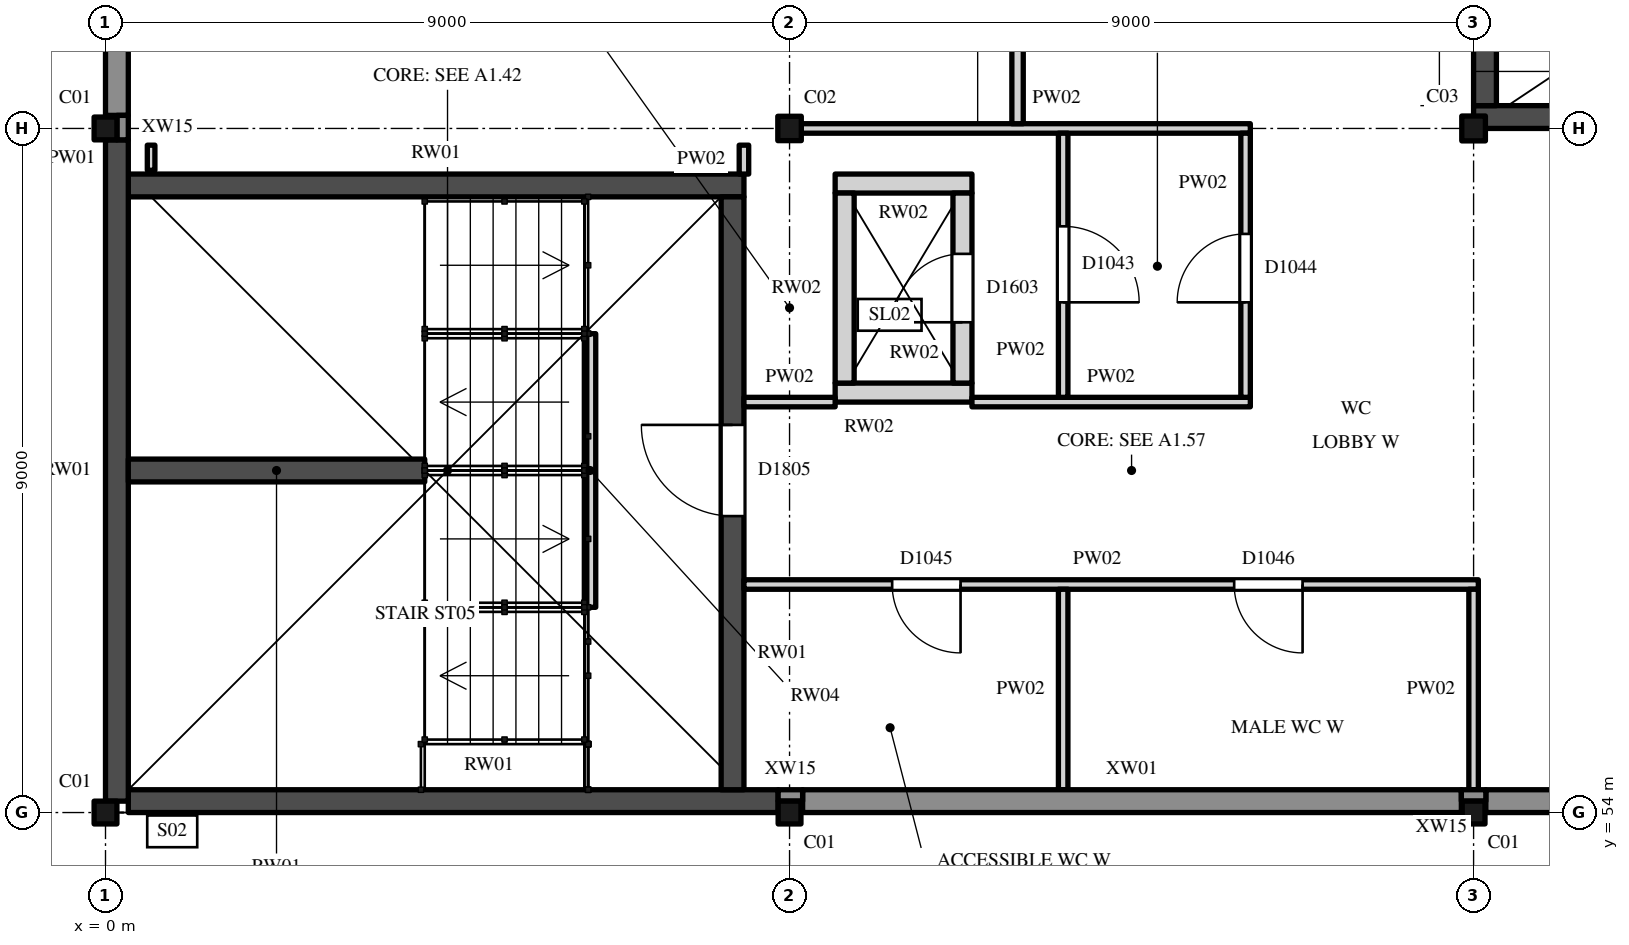
"""IFC4 building model, lengths in metres.
Left out: names, types, materials, properties, quantities, classifications, styles, units other than length and angle.
Written with IfcOpenShell. Run it as: python <this file> out.ifc"""

import sys

from ifc_helpers import new_model, si_unit, direction, frame, frame_2d, origin, origin_2d, place, context, subcontext, project, spatial, rectangle, hollow_rectangle, i_section, extrude, element, fill, save


model = new_model("IFC4")
c1 = context("Model", 3, precision=1e-05, world=origin(), true_north=direction((0.0, 1.0)))
c2 = subcontext(c1, "Body", "Model", "MODEL_VIEW")
j1 = project(units=[si_unit("LENGTHUNIT", "METRE"), si_unit("PLANEANGLEUNIT", "RADIAN")], contexts=[c1])
p1 = place(None, origin())
s1 = spatial("IfcSite", under=j1, at=p1, CompositionType="ELEMENT")
p2 = place(p1, origin())
s2 = spatial("IfcBuilding", under=s1, at=p2, CompositionType="ELEMENT")
p3 = place(p2, frame((0.0, 0.0, 6.0)))
s3 = spatial("IfcBuildingStorey", under=s2, at=p3, CompositionType="ELEMENT", Elevation=6.0)
for number, where, z_axis, x_axis in (
    (1, (0.0, 54.0, 0.0), (0.0, 0.0, 1.0), (1.0, 0.0, 0.0)),
    (2, (9.0, 54.0, 0.0), (0.0, 0.0, 1.0), (1.0, 0.0, 0.0)),
    (3, (18.0, 54.0, 0.0), (0.0, 0.0, 1.0), (1.0, 0.0, 0.0)),
    (4, (0.0, 63.0, 0.0), (0.0, 0.0, 1.0), (1.0, 0.0, 0.0)),
):
    element("IfcColumn", number, at=place(p3, frame(where, z_axis=z_axis, x_axis=x_axis)), inside=s3, PredefinedType="COLUMN", context=c2, shape_type="SweptSolid", body=[
        extrude(hollow_rectangle(XDim=0.3, YDim=0.3, WallThickness=0.012, InnerFilletRadius=0.019, OuterFilletRadius=0.031, at=origin_2d()), origin(), (0.0, 0.0, 1.0), 5.0),
    ])
p4 = place(p3, frame((9.0, 63.0, 0.0), z_axis=(0.0, 0.0, 1.0), x_axis=(1.0, 0.0, 0.0)))
e5 = element("IfcColumn", 5, at=p4, inside=s3, PredefinedType="COLUMN", context=c2, shape_type="SweptSolid", body=[
    extrude(i_section(OverallWidth=0.309, OverallDepth=0.321, WebThickness=0.014, FlangeThickness=0.022, FilletRadius=0.017, at=origin_2d()), origin(), (0.0, 0.0, 1.0), 5.0),
])
p5 = place(p3, frame((18.0, 63.0, 0.0), z_axis=(0.0, 0.0, 1.0), x_axis=(1.0, 0.0, 0.0)))
e6 = element("IfcColumn", 6, at=p5, inside=s3, PredefinedType="COLUMN", context=c2, shape_type="SweptSolid", body=[
    extrude(i_section(OverallWidth=0.311, OverallDepth=0.327, WebThickness=0.016, FlangeThickness=0.025, FilletRadius=0.017, at=origin_2d()), origin(), (0.0, 0.0, 1.0), 5.0),
])
p6 = place(p3, frame((0.3, 54.15, 0.0), z_axis=(0.0, 0.0, 1.0), x_axis=(1.0, 0.0, 0.0)))
e7 = element("IfcWall", 7, at=p6, inside=s3, PredefinedType="SHEAR", context=c2, shape_type="SweptSolid", body=[
    extrude(rectangle(XDim=8.55, YDim=0.3, at=frame_2d((4.275, 0.0))), origin(), (0.0, 0.0, 1.0), 5.0),
])
p7 = place(p3, frame((0.3, 62.25, 0.0), z_axis=(0.0, 0.0, 1.0), x_axis=(1.0, 0.0, 0.0)))
e8 = element("IfcWall", 8, at=p7, inside=s3, PredefinedType="SHEAR", context=c2, shape_type="SweptSolid", body=[
    extrude(rectangle(XDim=8.1, YDim=0.3, at=frame_2d((4.05, 0.0))), origin(), (0.0, 0.0, 1.0), 5.0),
])
p8 = place(p3, frame((0.15, 54.15, 0.0), z_axis=(0.0, 0.0, 1.0), x_axis=(0.0, 1.0, 0.0)))
e9 = element("IfcWall", 9, at=p8, inside=s3, PredefinedType="SHEAR", context=c2, shape_type="SweptSolid", body=[
    extrude(rectangle(XDim=8.7, YDim=0.3, at=frame_2d((4.35, 0.0))), origin(), (0.0, 0.0, 1.0), 5.0),
])
p9 = place(p3, frame((8.25, 54.3, 0.0), z_axis=(0.0, 0.0, 1.0), x_axis=(0.0, 1.0, 0.0)))
e10 = element("IfcWall", 10, at=p9, inside=s3, PredefinedType="SHEAR", context=c2, shape_type="SweptSolid", body=[
    extrude(rectangle(XDim=7.8, YDim=0.3, at=frame_2d((3.9, 0.0))), origin(), (0.0, 0.0, 1.0), 5.0),
])
p10 = place(p9, frame((3.6, 0.0, 0.0)))
e11 = element("IfcOpeningElement", 11, at=p10, cuts=e10, PredefinedType="OPENING", context=c2, shape_type="SweptSolid", body=[
    extrude(rectangle(XDim=1.2, YDim=2.1, at=frame_2d((0.6, 1.05))), frame((0.0, 0.16, 0.0), z_axis=(0.0, -1.0, 0.0), x_axis=(1.0, 0.0, 0.0)), (0.0, 0.0, 1.0), 0.32),
])
p11 = place(p3, frame((4.2, 58.5, 0.0), z_axis=(0.0, 0.0, 1.0), x_axis=(-1.0, 0.0, 0.0)))
e12 = element("IfcWall", 12, at=p11, inside=s3, PredefinedType="SHEAR", context=c2, shape_type="SweptSolid", body=[
    extrude(rectangle(XDim=3.9, YDim=0.3, at=frame_2d((1.95, 0.0))), origin(), (0.0, 0.0, 1.0), 5.0),
])
p12 = place(p3, frame((6.375, 56.7, 0.0), z_axis=(0.0, 0.0, 1.0), x_axis=(0.0, 1.0, 0.0)))
e13 = element("IfcWall", 13, at=p12, inside=s3, PredefinedType="STANDARD", context=c2, shape_type="SweptSolid", body=[
    extrude(rectangle(XDim=3.6, YDim=0.15, at=frame_2d((1.8, 0.0))), origin(), (0.0, 0.0, 1.0), 2.3),
])
for number, where, z_axis, x_axis in (
    (14, (9.6, 59.525, 0.0), (0.0, 0.0, 1.0), (1.0, 0.0, 0.0)),
    (15, (9.6, 62.275, 0.0), (0.0, 0.0, 1.0), (1.0, 0.0, 0.0)),
):
    element("IfcWall", number, at=place(p3, frame(where, z_axis=z_axis, x_axis=x_axis)), inside=s3, PredefinedType="STANDARD", context=c2, shape_type="SweptSolid", body=[
        extrude(rectangle(XDim=1.8, YDim=0.25, at=frame_2d((0.9, 0.0))), origin(), (0.0, 0.0, 1.0), 5.0),
    ])
p13 = place(p3, frame((9.725, 59.65, 0.0), z_axis=(0.0, 0.0, 1.0), x_axis=(0.0, 1.0, 0.0)))
e16 = element("IfcWall", 16, at=p13, inside=s3, PredefinedType="STANDARD", context=c2, shape_type="SweptSolid", body=[
    extrude(rectangle(XDim=2.5, YDim=0.25, at=frame_2d((1.25, 0.0))), origin(), (0.0, 0.0, 1.0), 5.0),
])
p14 = place(p3, frame((11.275, 59.65, 0.0), z_axis=(0.0, 0.0, 1.0), x_axis=(0.0, 1.0, 0.0)))
e17 = element("IfcWall", 17, at=p14, inside=s3, PredefinedType="STANDARD", context=c2, shape_type="SweptSolid", body=[
    extrude(rectangle(XDim=2.5, YDim=0.25, at=frame_2d((1.25, 0.0))), origin(), (0.0, 0.0, 1.0), 5.0),
])
p15 = place(p14, frame((0.8, 0.0, 0.0)))
e18 = element("IfcOpeningElement", 18, at=p15, cuts=e17, PredefinedType="OPENING", context=c2, shape_type="SweptSolid", body=[
    extrude(rectangle(XDim=0.9, YDim=2.1, at=frame_2d((0.45, 1.05))), frame((0.0, 0.135, 0.0), z_axis=(0.0, -1.0, 0.0), x_axis=(1.0, 0.0, 0.0)), (0.0, 0.0, 1.0), 0.27),
])
p16 = place(p3, frame((18.0, 63.15, 0.0), z_axis=(0.0, 0.0, 1.0), x_axis=(1.0, 0.0, 0.0)))
e19 = element("IfcWall", 19, at=p16, inside=s3, PredefinedType="SHEAR", context=c2, shape_type="SweptSolid", body=[
    extrude(rectangle(XDim=9.0, YDim=0.3, at=frame_2d((4.5, 0.0))), origin(), (0.0, 0.0, 1.0), 4.825),
])
p17 = place(p3, frame((18.15, 63.3, 0.0), z_axis=(0.0, 0.0, 1.0), x_axis=(0.0, 1.0, 0.0)))
e20 = element("IfcWall", 20, at=p17, inside=s3, PredefinedType="SHEAR", context=c2, shape_type="SweptSolid", body=[
    extrude(rectangle(XDim=8.7, YDim=0.3, at=frame_2d((4.35, 0.0))), origin(), (0.0, 0.0, 1.0), 4.825),
])
p18 = place(p3, frame((9.172, 54.15, 0.0), z_axis=(0.0, 0.0, 1.0), x_axis=(1.0, 0.0, 0.0)))
e21 = element("IfcWall", 21, at=p18, inside=s3, PredefinedType="SOLIDWALL", context=c2, shape_type="SweptSolid", body=[
    extrude(rectangle(XDim=8.667, YDim=0.3, at=frame_2d((4.333, 0.0))), origin(), (0.0, 0.0, 1.0), 4.469),
])
p19 = place(p3, frame((18.161, 54.15, 0.0), z_axis=(0.0, 0.0, 1.0), x_axis=(1.0, 0.0, 0.0)))
e22 = element("IfcWall", 22, at=p19, inside=s3, PredefinedType="SOLIDWALL", context=c2, shape_type="SweptSolid", body=[
    extrude(rectangle(XDim=8.678, YDim=0.3, at=frame_2d((4.339, 0.0))), origin(), (0.0, 0.0, 1.0), 4.469),
])
p20 = place(p3, frame((0.15, 63.172, 0.0), z_axis=(0.0, 0.0, 1.0), x_axis=(0.0, 1.0, 0.0)))
e23 = element("IfcWall", 23, at=p20, inside=s3, PredefinedType="SOLIDWALL", context=c2, shape_type="SweptSolid", body=[
    extrude(rectangle(XDim=8.667, YDim=0.3, at=frame_2d((4.333, 0.0))), origin(), (0.0, 0.0, 1.0), 4.365),
])
p21 = place(p20, frame((3.728, 0.0, 1.0)))
e24 = element("IfcOpeningElement", 24, at=p21, cuts=e23, PredefinedType="OPENING", context=c2, shape_type="SweptSolid", body=[
    extrude(rectangle(XDim=1.2, YDim=3.0, at=frame_2d((0.6, 1.5))), frame((0.0, 0.16, 0.0), z_axis=(0.0, -1.0, 0.0), x_axis=(1.0, 0.0, 0.0)), (0.0, 0.0, 1.0), 0.32),
])
p22 = place(p3, frame((8.85, 54.225, 0.0), z_axis=(0.0, 0.0, 1.0), x_axis=(1.0, 0.0, 0.0)))
e25 = element("IfcWall", 25, at=p22, inside=s3, PredefinedType="SOLIDWALL", context=c2, shape_type="SweptSolid", body=[
    extrude(rectangle(XDim=0.322, YDim=0.15, at=frame_2d((0.161, 0.0))), origin(), (0.0, 0.0, 1.0), 5.0),
])
p23 = place(p3, frame((17.839, 54.225, 0.0), z_axis=(0.0, 0.0, 1.0), x_axis=(1.0, 0.0, 0.0)))
e26 = element("IfcWall", 26, at=p23, inside=s3, PredefinedType="SOLIDWALL", context=c2, shape_type="SweptSolid", body=[
    extrude(rectangle(XDim=0.322, YDim=0.15, at=frame_2d((0.161, 0.0))), origin(), (0.0, 0.0, 1.0), 4.469),
])
p24 = place(p3, frame((0.225, 62.85, 0.0), z_axis=(0.0, 0.0, 1.0), x_axis=(0.0, 1.0, 0.0)))
e27 = element("IfcWall", 27, at=p24, inside=s3, PredefinedType="SOLIDWALL", context=c2, shape_type="SweptSolid", body=[
    extrude(rectangle(XDim=0.322, YDim=0.15, at=frame_2d((0.161, 0.0))), origin(), (0.0, 0.0, 1.0), 5.0),
])
p25 = place(p3, frame((8.4, 57.0, 0.0), z_axis=(0.0, 0.0, 1.0), x_axis=(1.0, 0.0, 0.0)))
e28 = element("IfcWall", 28, at=p25, inside=s3, PredefinedType="PARTITIONING", context=c2, shape_type="SweptSolid", body=[
    extrude(rectangle(XDim=9.663, YDim=0.125, at=frame_2d((4.831, 0.0))), origin(), (0.0, 0.0, 1.0), 4.469),
])
p26 = place(p25, frame((1.95, 0.0, 0.0)))
e29 = element("IfcOpeningElement", 29, at=p26, cuts=e28, PredefinedType="OPENING", context=c2, shape_type="SweptSolid", body=[
    extrude(rectangle(XDim=0.9, YDim=2.1, at=frame_2d((0.45, 1.05))), frame((0.0, 0.073, 0.0), z_axis=(0.0, -1.0, 0.0), x_axis=(1.0, 0.0, 0.0)), (0.0, 0.0, 1.0), 0.145),
])
p27 = place(p25, frame((6.45, 0.0, 0.0)))
e30 = element("IfcOpeningElement", 30, at=p27, cuts=e28, PredefinedType="OPENING", context=c2, shape_type="SweptSolid", body=[
    extrude(rectangle(XDim=0.9, YDim=2.1, at=frame_2d((0.45, 1.05))), frame((0.0, 0.073, 0.0), z_axis=(0.0, -1.0, 0.0), x_axis=(1.0, 0.0, 0.0)), (0.0, 0.0, 1.0), 0.145),
])
p28 = place(p3, frame((8.4, 59.4, 0.0), z_axis=(0.0, 0.0, 1.0), x_axis=(1.0, 0.0, 0.0)))
e31 = element("IfcWall", 31, at=p28, inside=s3, PredefinedType="PARTITIONING", context=c2, shape_type="SweptSolid", body=[
    extrude(rectangle(XDim=1.2, YDim=0.125, at=frame_2d((0.6, 0.0))), origin(), (0.0, 0.0, 1.0), 4.825),
])
p29 = place(p3, frame((11.4, 59.4, 0.0), z_axis=(0.0, 0.0, 1.0), x_axis=(1.0, 0.0, 0.0)))
e32 = element("IfcWall", 32, at=p29, inside=s3, PredefinedType="PARTITIONING", context=c2, shape_type="SweptSolid", body=[
    extrude(rectangle(XDim=3.663, YDim=0.125, at=frame_2d((1.831, 0.0))), origin(), (0.0, 0.0, 1.0), 4.825),
])
p30 = place(p3, frame((9.155, 63.0, 0.0), z_axis=(0.0, 0.0, 1.0), x_axis=(1.0, 0.0, 0.0)))
e33 = element("IfcWall", 33, at=p30, inside=s3, PredefinedType="PARTITIONING", context=c2, shape_type="SweptSolid", body=[
    extrude(rectangle(XDim=5.908, YDim=0.125, at=frame_2d((2.954, 0.0))), origin(), (0.0, 0.0, 1.0), 4.469),
])
p31 = place(p3, frame((0.6, 62.45, 0.0), z_axis=(0.0, 0.0, 1.0), x_axis=(0.0, 1.0, 0.0)))
e34 = element("IfcWall", 34, at=p31, inside=s3, PredefinedType="PARTITIONING", context=c2, shape_type="SweptSolid", body=[
    extrude(rectangle(XDim=0.33, YDim=0.1, at=frame_2d((0.165, 0.0))), origin(), (0.0, 0.0, 1.0), 4.825),
])
p32 = place(p3, frame((8.4, 62.4, 0.0), z_axis=(0.0, 0.0, 1.0), x_axis=(0.0, 1.0, 0.0)))
e35 = element("IfcWall", 35, at=p32, inside=s3, PredefinedType="PARTITIONING", context=c2, shape_type="SweptSolid", body=[
    extrude(rectangle(XDim=0.38, YDim=0.125, at=frame_2d((0.19, 0.0))), origin(), (0.0, 0.0, 1.0), 4.825),
])
p33 = place(p3, frame((12.0, 63.062, 0.0), z_axis=(0.0, 0.0, 1.0), x_axis=(0.0, 1.0, 0.0)))
e36 = element("IfcWall", 36, at=p33, inside=s3, PredefinedType="PARTITIONING", context=c2, shape_type="SweptSolid", body=[
    extrude(rectangle(XDim=17.863, YDim=0.15, at=frame_2d((8.931, 0.0))), origin(), (0.0, 0.0, 1.0), 4.825),
])
p34 = place(p33, frame((8.05, 0.0, 0.0)))
e37 = element("IfcOpeningElement", 37, at=p34, cuts=e36, PredefinedType="OPENING", context=c2, shape_type="SweptSolid", body=[
    extrude(rectangle(XDim=1.8, YDim=2.4, at=frame_2d((0.9, 1.2))), frame((0.0, 0.085, 0.0), z_axis=(0.0, -1.0, 0.0), x_axis=(1.0, 0.0, 0.0)), (0.0, 0.0, 1.0), 0.17),
])
p35 = place(p3, frame((12.6, 54.3, 0.0), z_axis=(0.0, 0.0, 1.0), x_axis=(0.0, 1.0, 0.0)))
e38 = element("IfcWall", 38, at=p35, inside=s3, PredefinedType="PARTITIONING", context=c2, shape_type="SweptSolid", body=[
    extrude(rectangle(XDim=2.637, YDim=0.125, at=frame_2d((1.319, 0.0))), origin(), (0.0, 0.0, 1.0), 4.825),
])
p36 = place(p3, frame((12.6, 59.462, 0.0), z_axis=(0.0, 0.0, 1.0), x_axis=(0.0, 1.0, 0.0)))
e39 = element("IfcWall", 39, at=p36, inside=s3, PredefinedType="PARTITIONING", context=c2, shape_type="SweptSolid", body=[
    extrude(rectangle(XDim=3.475, YDim=0.125, at=frame_2d((1.738, 0.0))), origin(), (0.0, 0.0, 1.0), 4.825),
])
p37 = place(p36, frame((1.25, 0.0, 0.0)))
e40 = element("IfcOpeningElement", 40, at=p37, cuts=e39, PredefinedType="OPENING", context=c2, shape_type="SweptSolid", body=[
    extrude(rectangle(XDim=1.0, YDim=2.1, at=frame_2d((0.5, 1.05))), frame((0.0, 0.073, 0.0), z_axis=(0.0, -1.0, 0.0), x_axis=(1.0, 0.0, 0.0)), (0.0, 0.0, 1.0), 0.145),
])
p38 = place(p3, frame((15.0, 59.462, 0.0), z_axis=(0.0, 0.0, 1.0), x_axis=(0.0, 1.0, 0.0)))
e41 = element("IfcWall", 41, at=p38, inside=s3, PredefinedType="PARTITIONING", context=c2, shape_type="SweptSolid", body=[
    extrude(rectangle(XDim=3.475, YDim=0.125, at=frame_2d((1.738, 0.0))), origin(), (0.0, 0.0, 1.0), 4.825),
])
p39 = place(p38, frame((1.25, 0.0, 0.0)))
e42 = element("IfcOpeningElement", 42, at=p39, cuts=e41, PredefinedType="OPENING", context=c2, shape_type="SweptSolid", body=[
    extrude(rectangle(XDim=0.9, YDim=2.1, at=frame_2d((0.45, 1.05))), frame((0.0, 0.073, 0.0), z_axis=(0.0, -1.0, 0.0), x_axis=(1.0, 0.0, 0.0)), (0.0, 0.0, 1.0), 0.145),
])
p40 = place(p3, frame((18.0, 54.3, 0.0), z_axis=(0.0, 0.0, 1.0), x_axis=(0.0, 1.0, 0.0)))
e43 = element("IfcWall", 43, at=p40, inside=s3, PredefinedType="PARTITIONING", context=c2, shape_type="SweptSolid", body=[
    extrude(rectangle(XDim=2.637, YDim=0.125, at=frame_2d((1.319, 0.0))), origin(), (0.0, 0.0, 1.0), 4.365),
])
p41 = place(p10, origin())
e44 = element("IfcDoor", 44, at=p41, inside=s3, OperationType="SINGLE_SWING_LEFT", PredefinedType="DOOR", context=c2, shape_type="SweptSolid", body=[
    extrude(rectangle(XDim=1.2, YDim=2.1, at=frame_2d((0.6, 1.05))), frame((0.0, 0.025, 0.0), z_axis=(0.0, -1.0, 0.0), x_axis=(1.0, 0.0, 0.0)), (0.0, 0.0, 1.0), 0.05),
])
fill(e11, e44)
p42 = place(p15, origin())
e45 = element("IfcDoor", 45, at=p42, inside=s3, OperationType="SINGLE_SWING_RIGHT", PredefinedType="DOOR", context=c2, shape_type="SweptSolid", body=[
    extrude(rectangle(XDim=0.9, YDim=2.1, at=frame_2d((0.45, 1.05))), frame((0.0, 0.025, 0.0), z_axis=(0.0, -1.0, 0.0), x_axis=(1.0, 0.0, 0.0)), (0.0, 0.0, 1.0), 0.05),
])
fill(e18, e45)
p43 = place(p37, origin())
e46 = element("IfcDoor", 46, at=p43, inside=s3, OperationType="SINGLE_SWING_LEFT", PredefinedType="DOOR", context=c2, shape_type="SweptSolid", body=[
    extrude(rectangle(XDim=1.0, YDim=2.1, at=frame_2d((0.5, 1.05))), frame((0.0, 0.025, 0.0), z_axis=(0.0, -1.0, 0.0), x_axis=(1.0, 0.0, 0.0)), (0.0, 0.0, 1.0), 0.05),
])
fill(e40, e46)
p44 = place(p39, origin())
e47 = element("IfcDoor", 47, at=p44, inside=s3, OperationType="SINGLE_SWING_RIGHT", PredefinedType="DOOR", context=c2, shape_type="SweptSolid", body=[
    extrude(rectangle(XDim=0.9, YDim=2.1, at=frame_2d((0.45, 1.05))), frame((0.0, 0.025, 0.0), z_axis=(0.0, -1.0, 0.0), x_axis=(1.0, 0.0, 0.0)), (0.0, 0.0, 1.0), 0.05),
])
fill(e42, e47)
p45 = place(p26, origin())
e48 = element("IfcDoor", 48, at=p45, inside=s3, OperationType="SINGLE_SWING_RIGHT", PredefinedType="DOOR", context=c2, shape_type="SweptSolid", body=[
    extrude(rectangle(XDim=0.9, YDim=2.1, at=frame_2d((0.45, 1.05))), frame((0.0, 0.025, 0.0), z_axis=(0.0, -1.0, 0.0), x_axis=(1.0, 0.0, 0.0)), (0.0, 0.0, 1.0), 0.05),
])
fill(e29, e48)
p46 = place(p27, origin())
e49 = element("IfcDoor", 49, at=p46, inside=s3, OperationType="SINGLE_SWING_RIGHT", PredefinedType="DOOR", context=c2, shape_type="SweptSolid", body=[
    extrude(rectangle(XDim=0.9, YDim=2.1, at=frame_2d((0.45, 1.05))), frame((0.0, 0.025, 0.0), z_axis=(0.0, -1.0, 0.0), x_axis=(1.0, 0.0, 0.0)), (0.0, 0.0, 1.0), 0.05),
])
fill(e30, e49)
save(model, sys.argv[1])
